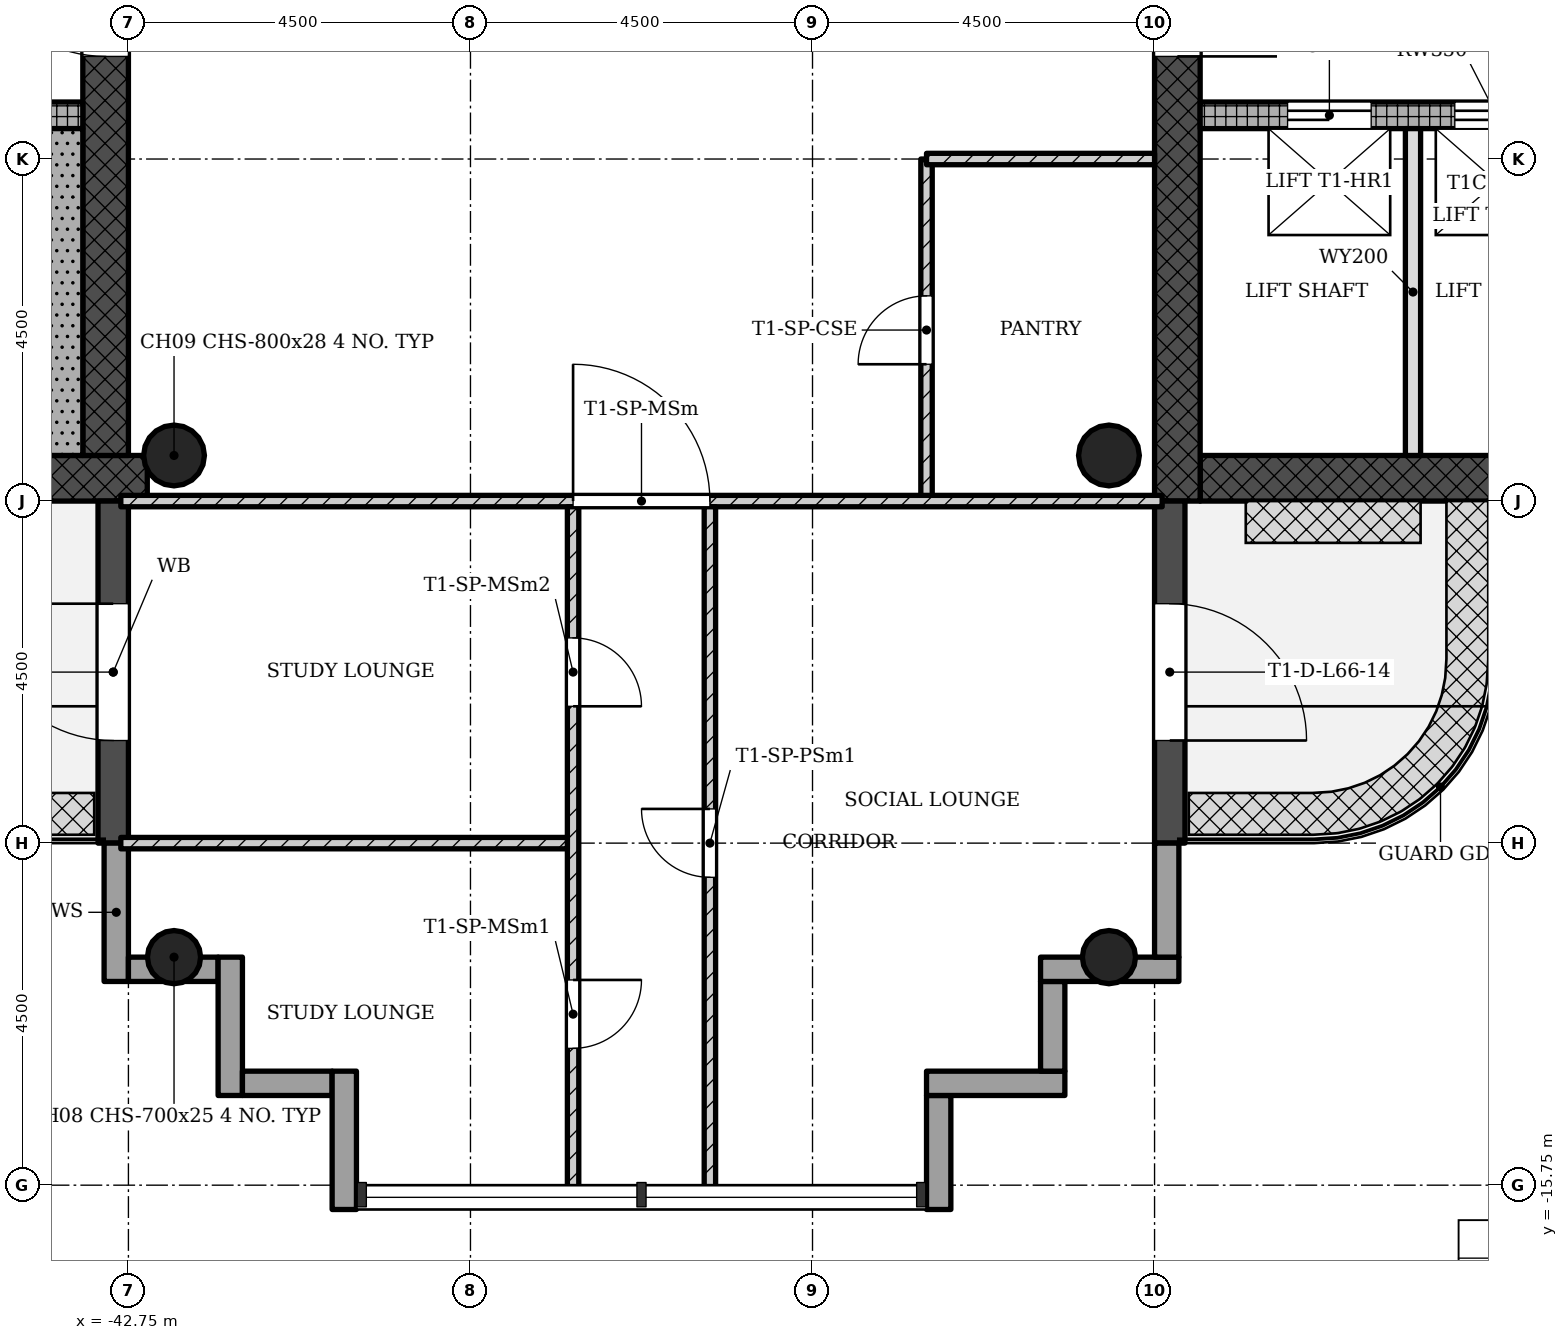
"""IFC4 building model, lengths in metres.
Left out: names, types, materials, properties, quantities, classifications, styles, units other than length and angle.
Written with IfcOpenShell. Run it as: python <this file> out.ifc"""

import sys

from ifc_helpers import new_model, si_unit, direction, frame, frame_2d, origin, origin_2d, place, context, subcontext, project, spatial, rectangle, hollow_circle, extrude, element, fill, save


model = new_model("IFC4")
c1 = context("Model", 3, precision=1e-05, world=origin(), true_north=direction((0.0, 1.0)))
c2 = subcontext(c1, "Body", "Model", "MODEL_VIEW")
j1 = project(units=[si_unit("LENGTHUNIT", "METRE"), si_unit("PLANEANGLEUNIT", "RADIAN")], contexts=[c1])
p1 = place(None, origin())
s1 = spatial("IfcSite", under=j1, at=p1, CompositionType="ELEMENT")
p2 = place(p1, origin())
s2 = spatial("IfcBuilding", under=s1, at=p2, CompositionType="ELEMENT")
p3 = place(p2, frame((0.0, 0.0, 237.9)))
s3 = spatial("IfcBuildingStorey", under=s2, at=p3, CompositionType="ELEMENT", Elevation=237.9)
p4 = place(p3, frame((-28.65, -6.45, 0.0), z_axis=(0.0, 0.0, 1.0), x_axis=(1.0, 0.0, 0.0)))
e1 = element("IfcWall", 1, at=p4, inside=s3, PredefinedType="SHEAR", context=c2, shape_type="SweptSolid", body=[
    extrude(rectangle(XDim=8.4, YDim=0.6, at=frame_2d((4.2, 0.0))), origin(), (0.0, 0.0, 1.0), 4.5),
])
p5 = place(p3, frame((-28.95, 6.15, 0.0), z_axis=(0.0, 0.0, 1.0), x_axis=(0.0, -1.0, 0.0)))
e2 = element("IfcWall", 2, at=p5, inside=s3, PredefinedType="SHEAR", context=c2, shape_type="SweptSolid", body=[
    extrude(rectangle(XDim=12.9, YDim=0.6, at=frame_2d((6.45, 0.0))), origin(), (0.0, 0.0, 1.0), 4.5),
])
p6 = place(p5, frame((5.25, 0.0, 0.0)))
e3 = element("IfcOpeningElement", 3, at=p6, cuts=e2, PredefinedType="OPENING", context=c2, shape_type="SweptSolid", body=[
    extrude(rectangle(XDim=1.8, YDim=2.1, at=frame_2d((0.9, 1.05))), frame((0.0, 0.31, 0.0), z_axis=(0.0, -1.0, 0.0), x_axis=(1.0, 0.0, 0.0)), (0.0, 0.0, 1.0), 0.62),
])
p7 = place(p3, frame((-28.65, -1.675, 0.0), z_axis=(0.0, 0.0, 1.0), x_axis=(1.0, 0.0, 0.0)))
e4 = element("IfcWall", 4, at=p7, inside=s3, PredefinedType="SHEAR", context=c2, shape_type="SweptSolid", body=[
    extrude(rectangle(XDim=7.8, YDim=0.35, at=frame_2d((3.9, 0.0))), origin(), (0.0, 0.0, 1.0), 4.5),
])
p8 = place(p7, frame((1.15, 0.0, 0.0)))
e5 = element("IfcOpeningElement", 5, at=p8, cuts=e4, PredefinedType="OPENING", context=c2, shape_type="SweptSolid", body=[
    extrude(rectangle(XDim=1.1, YDim=2.1, at=frame_2d((0.55, 1.05))), frame((0.0, 0.185, 0.0), z_axis=(0.0, -1.0, 0.0), x_axis=(1.0, 0.0, 0.0)), (0.0, 0.0, 1.0), 0.37),
])
p9 = place(p7, frame((3.35, 0.0, 0.0)))
e6 = element("IfcOpeningElement", 6, at=p9, cuts=e4, PredefinedType="OPENING", context=c2, shape_type="SweptSolid", body=[
    extrude(rectangle(XDim=1.1, YDim=2.1, at=frame_2d((0.55, 1.05))), frame((0.0, 0.185, 0.0), z_axis=(0.0, -1.0, 0.0), x_axis=(1.0, 0.0, 0.0)), (0.0, 0.0, 1.0), 0.37),
])
p10 = place(p7, frame((5.55, 0.0, 0.0)))
e7 = element("IfcOpeningElement", 7, at=p10, cuts=e4, PredefinedType="OPENING", context=c2, shape_type="SweptSolid", body=[
    extrude(rectangle(XDim=1.1, YDim=2.1, at=frame_2d((0.55, 1.05))), frame((0.0, 0.185, 0.0), z_axis=(0.0, -1.0, 0.0), x_axis=(1.0, 0.0, 0.0)), (0.0, 0.0, 1.0), 0.37),
])
p11 = place(p3, frame((-51.15, -6.45, 0.0), z_axis=(0.0, 0.0, 1.0), x_axis=(1.0, 0.0, 0.0)))
e8 = element("IfcWall", 8, at=p11, inside=s3, PredefinedType="SHEAR", context=c2, shape_type="SweptSolid", body=[
    extrude(rectangle(XDim=8.648, YDim=0.6, at=frame_2d((4.324, 0.0))), origin(), (0.0, 0.0, 1.0), 4.5),
])
p12 = place(p3, frame((-43.05, -6.15, 0.0), z_axis=(0.0, 0.0, 1.0), x_axis=(0.0, 1.0, 0.0)))
e9 = element("IfcWall", 9, at=p12, inside=s3, PredefinedType="SHEAR", context=c2, shape_type="SweptSolid", body=[
    extrude(rectangle(XDim=12.9, YDim=0.6, at=frame_2d((6.45, 0.0))), origin(), (0.0, 0.0, 1.0), 4.5),
])
p13 = place(p12, frame((5.25, 0.0, 0.0)))
e10 = element("IfcOpeningElement", 10, at=p13, cuts=e9, PredefinedType="OPENING", context=c2, shape_type="SweptSolid", body=[
    extrude(rectangle(XDim=1.8, YDim=2.1, at=frame_2d((0.9, 1.05))), frame((0.0, 0.31, 0.0), z_axis=(0.0, -1.0, 0.0), x_axis=(1.0, 0.0, 0.0)), (0.0, 0.0, 1.0), 0.62),
])
p14 = place(p3, frame((-51.15, -1.675, 0.0), z_axis=(0.0, 0.0, 1.0), x_axis=(1.0, 0.0, 0.0)))
e11 = element("IfcWall", 11, at=p14, inside=s3, PredefinedType="SHEAR", context=c2, shape_type="SweptSolid", body=[
    extrude(rectangle(XDim=7.8, YDim=0.35, at=frame_2d((3.9, 0.0))), origin(), (0.0, 0.0, 1.0), 4.5),
])
p15 = place(p14, frame((5.85, 0.0, 0.0)))
e12 = element("IfcOpeningElement", 12, at=p15, cuts=e11, PredefinedType="OPENING", context=c2, shape_type="SweptSolid", body=[
    extrude(rectangle(XDim=0.9, YDim=2.1, at=frame_2d((0.45, 1.05))), frame((0.0, 0.185, 0.0), z_axis=(0.0, -1.0, 0.0), x_axis=(1.0, 0.0, 0.0)), (0.0, 0.0, 1.0), 0.37),
])
for number, where, z_axis, x_axis in (
    (13, (-42.15, -12.75, 0.0), (0.0, 0.0, 1.0), (1.0, 0.0, 0.0)),
    (14, (-29.85, -12.75, 0.0), (0.0, 0.0, 1.0), (1.0, 0.0, 0.0)),
):
    element("IfcColumn", number, at=place(p3, frame(where, z_axis=z_axis, x_axis=x_axis)), inside=s3, PredefinedType="COLUMN", context=c2, shape_type="SweptSolid", body=[
        extrude(hollow_circle(Radius=0.35, WallThickness=0.025, at=origin_2d()), origin(), (0.0, 0.0, 1.0), 4.5),
    ])
for number, where, z_axis, x_axis in (
    (15, (-42.15, -6.15, 0.0), (0.0, 0.0, 1.0), (1.0, 0.0, 0.0)),
    (16, (-29.85, -6.15, 0.0), (0.0, 0.0, 1.0), (1.0, 0.0, 0.0)),
):
    element("IfcColumn", number, at=place(p3, frame(where, z_axis=z_axis, x_axis=x_axis)), inside=s3, PredefinedType="COLUMN", context=c2, shape_type="SweptSolid", body=[
        extrude(hollow_circle(Radius=0.4, WallThickness=0.028, at=origin_2d()), origin(), (0.0, 0.0, 1.0), 4.5),
    ])
p16 = place(p3, frame((-42.95, -6.75, -0.02), z_axis=(0.0, 0.0, 1.0), x_axis=(0.0, -1.0, 0.0)))
e17 = element("IfcWall", 17, at=p16, inside=s3, PredefinedType="STANDARD", context=c2, shape_type="SweptSolid", body=[
    extrude(rectangle(XDim=4.5, YDim=0.4, at=frame_2d((2.25, 0.0))), origin(), (0.0, 0.0, 1.0), 4.22),
])
p17 = place(p16, frame((1.35, 0.0, 0.02)))
e18 = element("IfcOpeningElement", 18, at=p17, cuts=e17, PredefinedType="OPENING", context=c2, shape_type="SweptSolid", body=[
    extrude(rectangle(XDim=1.8, YDim=2.1, at=frame_2d((0.9, 1.05))), frame((0.0, 0.21, 0.0), z_axis=(0.0, -1.0, 0.0), x_axis=(1.0, 0.0, 0.0)), (0.0, 0.0, 1.0), 0.42),
])
p18 = place(p3, frame((-42.91, -11.25, -0.3), z_axis=(0.0, 0.0, 1.0), x_axis=(0.0, -1.0, 0.0)))
e19 = element("IfcWall", 19, at=p18, inside=s3, PredefinedType="STANDARD", context=c2, shape_type="SweptSolid", body=[
    extrude(rectangle(XDim=1.82, YDim=0.32, at=frame_2d((0.91, 0.0))), origin(), (0.0, 0.0, 1.0), 4.5),
])
p19 = place(p3, frame((-42.75, -12.91, -0.3), z_axis=(0.0, 0.0, 1.0), x_axis=(1.0, 0.0, 0.0)))
e20 = element("IfcWall", 20, at=p19, inside=s3, PredefinedType="STANDARD", context=c2, shape_type="SweptSolid", body=[
    extrude(rectangle(XDim=1.18, YDim=0.32, at=frame_2d((0.59, 0.0))), origin(), (0.0, 0.0, 1.0), 4.5),
])
p20 = place(p3, frame((-41.41, -12.75, -0.3), z_axis=(0.0, 0.0, 1.0), x_axis=(0.0, -1.0, 0.0)))
e21 = element("IfcWall", 21, at=p20, inside=s3, PredefinedType="STANDARD", context=c2, shape_type="SweptSolid", body=[
    extrude(rectangle(XDim=1.82, YDim=0.32, at=frame_2d((0.91, 0.0))), origin(), (0.0, 0.0, 1.0), 4.5),
])
p21 = place(p3, frame((-41.25, -14.41, -0.3), z_axis=(0.0, 0.0, 1.0), x_axis=(1.0, 0.0, 0.0)))
e22 = element("IfcWall", 22, at=p21, inside=s3, PredefinedType="STANDARD", context=c2, shape_type="SweptSolid", body=[
    extrude(rectangle(XDim=1.18, YDim=0.32, at=frame_2d((0.59, 0.0))), origin(), (0.0, 0.0, 1.0), 4.5),
])
p22 = place(p3, frame((-39.91, -14.25, -0.3), z_axis=(0.0, 0.0, 1.0), x_axis=(0.0, -1.0, 0.0)))
e23 = element("IfcWall", 23, at=p22, inside=s3, PredefinedType="STANDARD", context=c2, shape_type="SweptSolid", body=[
    extrude(rectangle(XDim=1.82, YDim=0.32, at=frame_2d((0.91, 0.0))), origin(), (0.0, 0.0, 1.0), 4.5),
])
p23 = place(p3, frame((-32.09, -16.07, -0.3), z_axis=(0.0, 0.0, 1.0), x_axis=(0.0, 1.0, 0.0)))
e24 = element("IfcWall", 24, at=p23, inside=s3, PredefinedType="STANDARD", context=c2, shape_type="SweptSolid", body=[
    extrude(rectangle(XDim=1.5, YDim=0.32, at=frame_2d((0.75, 0.0))), origin(), (0.0, 0.0, 1.0), 4.5),
])
p24 = place(p3, frame((-32.25, -14.41, -0.3), z_axis=(0.0, 0.0, 1.0), x_axis=(1.0, 0.0, 0.0)))
e25 = element("IfcWall", 25, at=p24, inside=s3, PredefinedType="STANDARD", context=c2, shape_type="SweptSolid", body=[
    extrude(rectangle(XDim=1.82, YDim=0.32, at=frame_2d((0.91, 0.0))), origin(), (0.0, 0.0, 1.0), 4.5),
])
p25 = place(p3, frame((-30.59, -14.25, -0.3), z_axis=(0.0, 0.0, 1.0), x_axis=(0.0, 1.0, 0.0)))
e26 = element("IfcWall", 26, at=p25, inside=s3, PredefinedType="STANDARD", context=c2, shape_type="SweptSolid", body=[
    extrude(rectangle(XDim=1.18, YDim=0.32, at=frame_2d((0.59, 0.0))), origin(), (0.0, 0.0, 1.0), 4.5),
])
p26 = place(p3, frame((-30.75, -12.91, -0.3), z_axis=(0.0, 0.0, 1.0), x_axis=(1.0, 0.0, 0.0)))
e27 = element("IfcWall", 27, at=p26, inside=s3, PredefinedType="STANDARD", context=c2, shape_type="SweptSolid", body=[
    extrude(rectangle(XDim=1.82, YDim=0.32, at=frame_2d((0.91, 0.0))), origin(), (0.0, 0.0, 1.0), 4.5),
])
p27 = place(p3, frame((-29.09, -12.75, -0.3), z_axis=(0.0, 0.0, 1.0), x_axis=(0.0, 1.0, 0.0)))
e28 = element("IfcWall", 28, at=p27, inside=s3, PredefinedType="STANDARD", context=c2, shape_type="SweptSolid", body=[
    extrude(rectangle(XDim=1.5, YDim=0.32, at=frame_2d((0.75, 0.0))), origin(), (0.0, 0.0, 1.0), 4.5),
])
p28 = place(p3, frame((-29.05, -11.25, -0.02), z_axis=(0.0, 0.0, 1.0), x_axis=(0.0, 1.0, 0.0)))
e29 = element("IfcWall", 29, at=p28, inside=s3, PredefinedType="STANDARD", context=c2, shape_type="SweptSolid", body=[
    extrude(rectangle(XDim=4.5, YDim=0.4, at=frame_2d((2.25, 0.0))), origin(), (0.0, 0.0, 1.0), 4.22),
])
p29 = place(p28, frame((1.35, 0.0, 0.02)))
e30 = element("IfcOpeningElement", 30, at=p29, cuts=e29, PredefinedType="OPENING", context=c2, shape_type="SweptSolid", body=[
    extrude(rectangle(XDim=1.8, YDim=2.1, at=frame_2d((0.9, 1.05))), frame((0.0, 0.21, 0.0), z_axis=(0.0, -1.0, 0.0), x_axis=(1.0, 0.0, 0.0)), (0.0, 0.0, 1.0), 0.42),
])
p30 = place(p3, frame((-25.85, -6.15, 0.0), z_axis=(0.0, 0.0, 1.0), x_axis=(0.0, 1.0, 0.0)))
e31 = element("IfcWall", 31, at=p30, inside=s3, PredefinedType="SOLIDWALL", context=c2, shape_type="SweptSolid", body=[
    extrude(rectangle(XDim=4.3, YDim=0.2, at=frame_2d((2.15, 0.0))), origin(), (0.0, 0.0, 1.0), 4.1),
])
p31 = place(p3, frame((-32.25, -6.75, 0.0), z_axis=(0.0, 0.0, 1.0), x_axis=(0.0, 1.0, 0.0)))
e32 = element("IfcWall", 32, at=p31, inside=s3, PredefinedType="PARTITIONING", context=c2, shape_type="SweptSolid", body=[
    extrude(rectangle(XDim=4.5, YDim=0.15, at=frame_2d((2.25, 0.0))), origin(), (0.0, 0.0, 1.0), 4.1),
])
p32 = place(p31, frame((1.8, 0.0, 0.0)))
e33 = element("IfcOpeningElement", 33, at=p32, cuts=e32, PredefinedType="OPENING", context=c2, shape_type="SweptSolid", body=[
    extrude(rectangle(XDim=0.9, YDim=2.1, at=frame_2d((0.45, 1.05))), frame((0.0, 0.085, 0.0), z_axis=(0.0, -1.0, 0.0), x_axis=(1.0, 0.0, 0.0)), (0.0, 0.0, 1.0), 0.17),
])
p33 = place(p3, frame((-32.25, -2.25, 0.0), z_axis=(0.0, 0.0, 1.0), x_axis=(1.0, 0.0, 0.0)))
e34 = element("IfcWall", 34, at=p33, inside=s3, PredefinedType="PARTITIONING", context=c2, shape_type="SweptSolid", body=[
    extrude(rectangle(XDim=3.0, YDim=0.15, at=frame_2d((1.5, 0.0))), origin(), (0.0, 0.0, 1.0), 4.1),
])
p34 = place(p3, frame((-42.85, -6.75, 0.0), z_axis=(0.0, 0.0, 1.0), x_axis=(1.0, 0.0, 0.0)))
e35 = element("IfcWall", 35, at=p34, inside=s3, PredefinedType="PARTITIONING", context=c2, shape_type="SweptSolid", body=[
    extrude(rectangle(XDim=13.7, YDim=0.15, at=frame_2d((6.85, 0.0))), origin(), (0.0, 0.0, 1.0), 4.1),
])
p35 = place(p34, frame((5.95, 0.0, 0.0)))
e36 = element("IfcOpeningElement", 36, at=p35, cuts=e35, PredefinedType="OPENING", context=c2, shape_type="SweptSolid", body=[
    extrude(rectangle(XDim=1.8, YDim=2.1, at=frame_2d((0.9, 1.05))), frame((0.0, 0.085, 0.0), z_axis=(0.0, -1.0, 0.0), x_axis=(1.0, 0.0, 0.0)), (0.0, 0.0, 1.0), 0.17),
])
p36 = place(p3, frame((-35.1, -15.85, 0.0), z_axis=(0.0, 0.0, 1.0), x_axis=(0.0, 1.0, 0.0)))
e37 = element("IfcWall", 37, at=p36, inside=s3, PredefinedType="PARTITIONING", context=c2, shape_type="SweptSolid", body=[
    extrude(rectangle(XDim=9.025, YDim=0.15, at=frame_2d((4.513, 0.0))), origin(), (0.0, 0.0, 1.0), 4.1),
])
p37 = place(p36, frame((4.15, 0.0, 0.0)))
e38 = element("IfcOpeningElement", 38, at=p37, cuts=e37, PredefinedType="OPENING", context=c2, shape_type="SweptSolid", body=[
    extrude(rectangle(XDim=0.9, YDim=2.1, at=frame_2d((0.45, 1.05))), frame((0.0, 0.085, 0.0), z_axis=(0.0, -1.0, 0.0), x_axis=(1.0, 0.0, 0.0)), (0.0, 0.0, 1.0), 0.17),
])
p38 = place(p3, frame((-36.9, -15.85, 0.0), z_axis=(0.0, 0.0, 1.0), x_axis=(0.0, 1.0, 0.0)))
e39 = element("IfcWall", 39, at=p38, inside=s3, PredefinedType="PARTITIONING", context=c2, shape_type="SweptSolid", body=[
    extrude(rectangle(XDim=9.025, YDim=0.15, at=frame_2d((4.513, 0.0))), origin(), (0.0, 0.0, 1.0), 4.1),
])
p39 = place(p38, frame((1.9, 0.0, 0.0)))
e40 = element("IfcOpeningElement", 40, at=p39, cuts=e39, PredefinedType="OPENING", context=c2, shape_type="SweptSolid", body=[
    extrude(rectangle(XDim=0.9, YDim=2.1, at=frame_2d((0.45, 1.05))), frame((0.0, 0.085, 0.0), z_axis=(0.0, -1.0, 0.0), x_axis=(1.0, 0.0, 0.0)), (0.0, 0.0, 1.0), 0.17),
])
p40 = place(p38, frame((6.4, 0.0, 0.0)))
e41 = element("IfcOpeningElement", 41, at=p40, cuts=e39, PredefinedType="OPENING", context=c2, shape_type="SweptSolid", body=[
    extrude(rectangle(XDim=0.9, YDim=2.1, at=frame_2d((0.45, 1.05))), frame((0.0, 0.085, 0.0), z_axis=(0.0, -1.0, 0.0), x_axis=(1.0, 0.0, 0.0)), (0.0, 0.0, 1.0), 0.17),
])
p41 = place(p3, frame((-36.975, -11.25, 0.0), z_axis=(0.0, 0.0, 1.0), x_axis=(-1.0, 0.0, 0.0)))
e42 = element("IfcWall", 42, at=p41, inside=s3, PredefinedType="PARTITIONING", context=c2, shape_type="SweptSolid", body=[
    extrude(rectangle(XDim=5.875, YDim=0.15, at=frame_2d((2.938, 0.0))), origin(), (0.0, 0.0, 1.0), 4.1),
])
p42 = place(p3, frame((-43.65, -1.85, 0.0), z_axis=(0.0, 0.0, 1.0), x_axis=(0.0, -1.0, 0.0)))
e43 = element("IfcWall", 43, at=p42, inside=s3, PredefinedType="SHEAR", context=c2, shape_type="SweptSolid", body=[
    extrude(rectangle(XDim=4.3, YDim=0.6, at=frame_2d((2.15, 0.0))), origin(), (0.0, 0.0, 1.0), 4.5),
])
p43 = place(p17, origin())
e44 = element("IfcDoor", 44, at=p43, inside=s3, OperationType="SINGLE_SWING_LEFT", PredefinedType="DOOR", context=c2, shape_type="SweptSolid", body=[
    extrude(rectangle(XDim=1.8, YDim=2.1, at=frame_2d((0.9, 1.05))), frame((0.0, 0.025, 0.0), z_axis=(0.0, -1.0, 0.0), x_axis=(1.0, 0.0, 0.0)), (0.0, 0.0, 1.0), 0.05),
])
fill(e18, e44)
p44 = place(p29, origin())
e45 = element("IfcDoor", 45, at=p44, inside=s3, OperationType="SINGLE_SWING_LEFT", PredefinedType="DOOR", context=c2, shape_type="SweptSolid", body=[
    extrude(rectangle(XDim=1.8, YDim=2.1, at=frame_2d((0.9, 1.05))), frame((0.0, 0.025, 0.0), z_axis=(0.0, -1.0, 0.0), x_axis=(1.0, 0.0, 0.0)), (0.0, 0.0, 1.0), 0.05),
])
fill(e30, e45)
p45 = place(p32, origin())
e46 = element("IfcDoor", 46, at=p45, inside=s3, OperationType="SINGLE_SWING_RIGHT", PredefinedType="DOOR", context=c2, shape_type="SweptSolid", body=[
    extrude(rectangle(XDim=0.9, YDim=2.1, at=frame_2d((0.45, 1.05))), frame((0.0, 0.025, 0.0), z_axis=(0.0, -1.0, 0.0), x_axis=(1.0, 0.0, 0.0)), (0.0, 0.0, 1.0), 0.05),
])
fill(e33, e46)
p46 = place(p35, origin())
e47 = element("IfcDoor", 47, at=p46, inside=s3, OperationType="SINGLE_SWING_RIGHT", PredefinedType="DOOR", context=c2, shape_type="SweptSolid", body=[
    extrude(rectangle(XDim=1.8, YDim=2.1, at=frame_2d((0.9, 1.05))), frame((0.0, 0.025, 0.0), z_axis=(0.0, -1.0, 0.0), x_axis=(1.0, 0.0, 0.0)), (0.0, 0.0, 1.0), 0.05),
])
fill(e36, e47)
p47 = place(p37, origin())
e48 = element("IfcDoor", 48, at=p47, inside=s3, OperationType="SINGLE_SWING_LEFT", PredefinedType="DOOR", context=c2, shape_type="SweptSolid", body=[
    extrude(rectangle(XDim=0.9, YDim=2.1, at=frame_2d((0.45, 1.05))), frame((0.0, 0.025, 0.0), z_axis=(0.0, -1.0, 0.0), x_axis=(1.0, 0.0, 0.0)), (0.0, 0.0, 1.0), 0.05),
])
fill(e38, e48)
p48 = place(p39, origin())
e49 = element("IfcDoor", 49, at=p48, inside=s3, OperationType="SINGLE_SWING_RIGHT", PredefinedType="DOOR", context=c2, shape_type="SweptSolid", body=[
    extrude(rectangle(XDim=0.9, YDim=2.1, at=frame_2d((0.45, 1.05))), frame((0.0, 0.025, 0.0), z_axis=(0.0, -1.0, 0.0), x_axis=(1.0, 0.0, 0.0)), (0.0, 0.0, 1.0), 0.05),
])
fill(e40, e49)
p49 = place(p40, origin())
e50 = element("IfcDoor", 50, at=p49, inside=s3, OperationType="SINGLE_SWING_LEFT", PredefinedType="DOOR", context=c2, shape_type="SweptSolid", body=[
    extrude(rectangle(XDim=0.9, YDim=2.1, at=frame_2d((0.45, 1.05))), frame((0.0, 0.025, 0.0), z_axis=(0.0, -1.0, 0.0), x_axis=(1.0, 0.0, 0.0)), (0.0, 0.0, 1.0), 0.05),
])
fill(e41, e50)
p50 = place(p8, origin())
e51 = element("IfcDoor", 51, at=p50, inside=s3, OperationType="SLIDING_TO_LEFT", PredefinedType="DOOR", context=c2, shape_type="SweptSolid", body=[
    extrude(rectangle(XDim=1.1, YDim=2.1, at=frame_2d((0.55, 1.05))), frame((0.0, 0.025, 0.0), z_axis=(0.0, -1.0, 0.0), x_axis=(1.0, 0.0, 0.0)), (0.0, 0.0, 1.0), 0.05),
])
fill(e5, e51)
p51 = place(p9, origin())
e52 = element("IfcDoor", 52, at=p51, inside=s3, OperationType="SLIDING_TO_LEFT", PredefinedType="DOOR", context=c2, shape_type="SweptSolid", body=[
    extrude(rectangle(XDim=1.1, YDim=2.1, at=frame_2d((0.55, 1.05))), frame((0.0, 0.025, 0.0), z_axis=(0.0, -1.0, 0.0), x_axis=(1.0, 0.0, 0.0)), (0.0, 0.0, 1.0), 0.05),
])
fill(e6, e52)
p52 = place(p6, origin())
e53 = element("IfcDoor", 53, at=p52, inside=s3, OperationType="SINGLE_SWING_LEFT", PredefinedType="DOOR", context=c2, shape_type="SweptSolid", body=[
    extrude(rectangle(XDim=1.8, YDim=2.1, at=frame_2d((0.9, 1.05))), frame((0.0, 0.025, 0.0), z_axis=(0.0, -1.0, 0.0), x_axis=(1.0, 0.0, 0.0)), (0.0, 0.0, 1.0), 0.05),
])
fill(e3, e53)
p53 = place(p13, origin())
e54 = element("IfcDoor", 54, at=p53, inside=s3, OperationType="SINGLE_SWING_LEFT", PredefinedType="DOOR", context=c2, shape_type="SweptSolid", body=[
    extrude(rectangle(XDim=1.8, YDim=2.1, at=frame_2d((0.9, 1.05))), frame((0.0, 0.025, 0.0), z_axis=(0.0, -1.0, 0.0), x_axis=(1.0, 0.0, 0.0)), (0.0, 0.0, 1.0), 0.05),
])
fill(e10, e54)
save(model, sys.argv[1])
